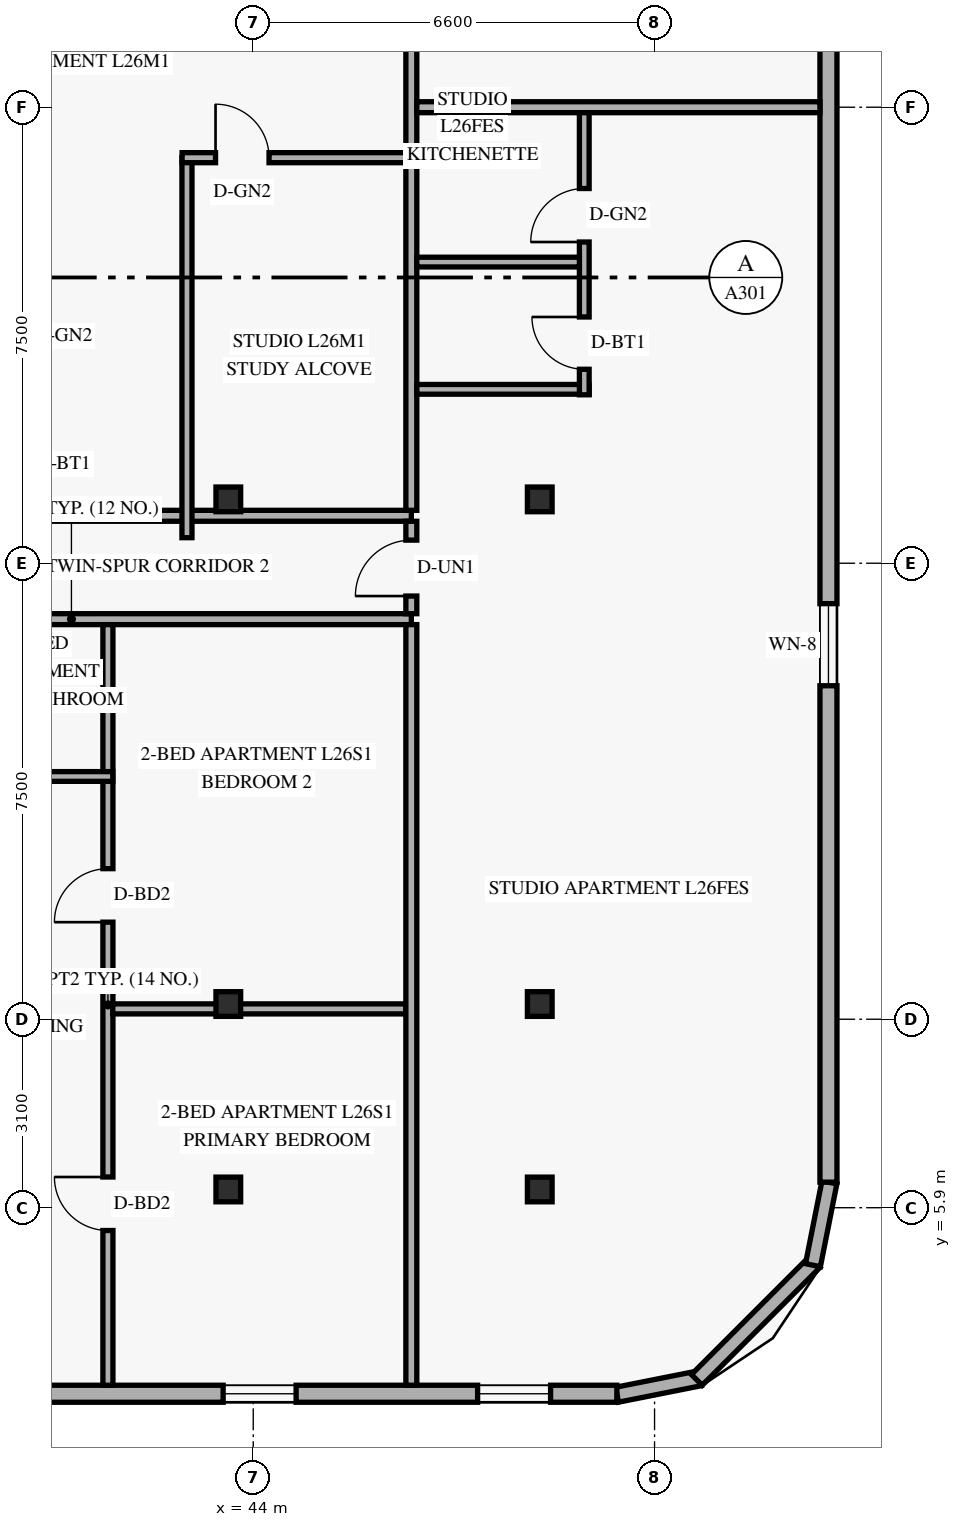
"""IFC4 building model, lengths in metres.
Left out: names, types, materials, properties, quantities, classifications, styles, units other than length and angle.
Written with IfcOpenShell. Run it as: python <this file> out.ifc"""

import sys

from ifc_helpers import new_model, si_unit, direction, frame, frame_2d, origin, origin_2d, place, context, subcontext, project, spatial, rectangle, hollow_rectangle, extrude, element, fill, save


model = new_model("IFC4")
c1 = context("Model", 3, precision=1e-05, world=origin(), true_north=direction((0.0, 1.0)))
c2 = subcontext(c1, "Body", "Model", "MODEL_VIEW")
j1 = project(units=[si_unit("LENGTHUNIT", "METRE"), si_unit("PLANEANGLEUNIT", "RADIAN")], contexts=[c1])
p1 = place(None, origin())
s1 = spatial("IfcSite", under=j1, at=p1, CompositionType="ELEMENT")
p2 = place(p1, origin())
s2 = spatial("IfcBuilding", under=s1, at=p2, CompositionType="ELEMENT")
p3 = place(p2, frame((0.0, 0.0, 102.6)))
s3 = spatial("IfcBuildingStorey", under=s2, at=p3, CompositionType="ELEMENT", Elevation=102.6)
for number, where, z_axis, x_axis in (
    (1, (43.527, 6.2, 0.0), (0.035, 0.0, 0.999), (0.0, 1.0, 0.0)),
    (2, (43.527, 9.25, 0.0), (0.035, 0.0, 0.999), (0.0, 1.0, 0.0)),
    (3, (43.527, 17.55, 0.0), (0.035, 0.0, 0.999), (0.0, 1.0, 0.0)),
):
    element("IfcColumn", number, at=place(p3, frame(where, z_axis=z_axis, x_axis=x_axis)), inside=s3, PredefinedType="COLUMN", context=c2, shape_type="SweptSolid", body=[
        extrude(hollow_rectangle(XDim=0.406, YDim=0.406, WallThickness=0.016, at=origin_2d()), origin(), (0.0, 0.0, 1.0), 3.602),
    ])
for number, where, z_axis, x_axis in (
    (4, (48.608, 6.2, 0.0), (0.058, 0.0, 0.998), (0.0, 1.0, 0.0)),
    (5, (48.608, 9.25, 0.0), (0.058, 0.0, 0.998), (0.0, 1.0, 0.0)),
    (6, (48.608, 17.55, 0.0), (0.058, 0.0, 0.998), (0.0, 1.0, 0.0)),
):
    element("IfcColumn", number, at=place(p3, frame(where, z_axis=z_axis, x_axis=x_axis)), inside=s3, PredefinedType="COLUMN", context=c2, shape_type="SweptSolid", body=[
        extrude(hollow_rectangle(XDim=0.406, YDim=0.406, WallThickness=0.016, at=origin_2d()), origin(), (0.0, 0.0, 1.0), 3.606),
    ])
p4 = place(p3, frame((49.983, 2.824, 0.0), z_axis=(0.0, 0.0, 1.0), x_axis=(0.980809899341, 0.19496651342, 0.0)))
e7 = element("IfcWall", 7, at=p4, inside=s3, PredefinedType="SOLIDWALL", context=c2, shape_type="SweptSolid", body=[
    extrude(rectangle(XDim=1.389, YDim=0.25, at=frame_2d((0.694, 0.0))), origin(), (0.0, 0.0, 1.0), 3.36),
])
p5 = place(p3, frame((51.295, 3.068, 0.0), z_axis=(0.0, 0.0, 1.0), x_axis=(0.707151344399, 0.707062215165, 0.0)))
e8 = element("IfcWall", 8, at=p5, inside=s3, PredefinedType="SOLIDWALL", context=c2, shape_type="SweptSolid", body=[
    extrude(rectangle(XDim=2.739, YDim=0.25, at=frame_2d((1.37, 0.0))), origin(), (0.0, 0.0, 1.0), 3.36),
])
p6 = place(p3, frame((53.205, 4.955, 0.0), z_axis=(0.0, 0.0, 1.0), x_axis=(0.195000137217, 0.980803214965, 0.0)))
e9 = element("IfcWall", 9, at=p6, inside=s3, PredefinedType="SOLIDWALL", context=c2, shape_type="SweptSolid", body=[
    extrude(rectangle(XDim=1.388, YDim=0.25, at=frame_2d((0.694, 0.0))), origin(), (0.0, 0.0, 1.0), 3.36),
])
p7 = place(p3, frame((13.42, 2.84, 0.0), z_axis=(0.0, 0.0, 1.0), x_axis=(1.0, 0.0, 0.0)))
e10 = element("IfcWall", 10, at=p7, inside=s3, PredefinedType="SOLIDWALL", context=c2, shape_type="SweptSolid", body=[
    extrude(rectangle(XDim=36.56, YDim=0.28, at=frame_2d((18.28, 0.0))), origin(), (0.0, 0.0, 1.0), 3.36),
])
p8 = place(p7, frame((3.515, 0.0, 0.85)))
e11 = element("IfcOpeningElement", 11, at=p8, cuts=e10, PredefinedType="OPENING", context=c2, shape_type="SweptSolid", body=[
    extrude(rectangle(XDim=1.2, YDim=1.5, at=frame_2d((0.6, 0.75))), frame((0.0, 0.15, 0.0), z_axis=(0.0, -1.0, 0.0), x_axis=(1.0, 0.0, 0.0)), (0.0, 0.0, 1.0), 0.3),
])
p9 = place(p7, frame((10.005, 0.0, 0.85)))
e12 = element("IfcOpeningElement", 12, at=p9, cuts=e10, PredefinedType="OPENING", context=c2, shape_type="SweptSolid", body=[
    extrude(rectangle(XDim=1.2, YDim=1.5, at=frame_2d((0.6, 0.75))), frame((0.0, 0.15, 0.0), z_axis=(0.0, -1.0, 0.0), x_axis=(1.0, 0.0, 0.0)), (0.0, 0.0, 1.0), 0.3),
])
p10 = place(p7, frame((16.89, 0.0, 0.85)))
e13 = element("IfcOpeningElement", 13, at=p10, cuts=e10, PredefinedType="OPENING", context=c2, shape_type="SweptSolid", body=[
    extrude(rectangle(XDim=1.2, YDim=1.5, at=frame_2d((0.6, 0.75))), frame((0.0, 0.15, 0.0), z_axis=(0.0, -1.0, 0.0), x_axis=(1.0, 0.0, 0.0)), (0.0, 0.0, 1.0), 0.3),
])
p11 = place(p7, frame((24.495, 0.0, 0.85)))
e14 = element("IfcOpeningElement", 14, at=p11, cuts=e10, PredefinedType="OPENING", context=c2, shape_type="SweptSolid", body=[
    extrude(rectangle(XDim=1.2, YDim=1.5, at=frame_2d((0.6, 0.75))), frame((0.0, 0.15, 0.0), z_axis=(0.0, -1.0, 0.0), x_axis=(1.0, 0.0, 0.0)), (0.0, 0.0, 1.0), 0.3),
])
p12 = place(p7, frame((30.085, 0.0, 0.85)))
e15 = element("IfcOpeningElement", 15, at=p12, cuts=e10, PredefinedType="OPENING", context=c2, shape_type="SweptSolid", body=[
    extrude(rectangle(XDim=1.2, YDim=1.5, at=frame_2d((0.6, 0.75))), frame((0.0, 0.15, 0.0), z_axis=(0.0, -1.0, 0.0), x_axis=(1.0, 0.0, 0.0)), (0.0, 0.0, 1.0), 0.3),
])
p13 = place(p7, frame((34.27, 0.0, 0.85)))
e16 = element("IfcOpeningElement", 16, at=p13, cuts=e10, PredefinedType="OPENING", context=c2, shape_type="SweptSolid", body=[
    extrude(rectangle(XDim=1.2, YDim=1.5, at=frame_2d((0.6, 0.75))), frame((0.0, 0.15, 0.0), z_axis=(0.0, -1.0, 0.0), x_axis=(1.0, 0.0, 0.0)), (0.0, 0.0, 1.0), 0.3),
])
p14 = place(p3, frame((53.46, 6.32, 0.0), z_axis=(0.0, 0.0, 1.0), x_axis=(0.0, 1.0, 0.0)))
e17 = element("IfcWall", 17, at=p14, inside=s3, PredefinedType="SOLIDWALL", context=c2, shape_type="SweptSolid", body=[
    extrude(rectangle(XDim=35.36, YDim=0.28, at=frame_2d((17.68, 0.0))), origin(), (0.0, 0.0, 1.0), 3.36),
])
p15 = place(p14, frame((8.165, 0.0, 0.85)))
e18 = element("IfcOpeningElement", 18, at=p15, cuts=e17, PredefinedType="OPENING", context=c2, shape_type="SweptSolid", body=[
    extrude(rectangle(XDim=1.35, YDim=1.55, at=frame_2d((0.675, 0.775))), frame((0.0, 0.15, 0.0), z_axis=(0.0, -1.0, 0.0), x_axis=(1.0, 0.0, 0.0)), (0.0, 0.0, 1.0), 0.3),
])
p16 = place(p14, frame((25.845, 0.0, 0.85)))
e19 = element("IfcOpeningElement", 19, at=p16, cuts=e17, PredefinedType="OPENING", context=c2, shape_type="SweptSolid", body=[
    extrude(rectangle(XDim=1.35, YDim=1.55, at=frame_2d((0.675, 0.775))), frame((0.0, 0.15, 0.0), z_axis=(0.0, -1.0, 0.0), x_axis=(1.0, 0.0, 0.0)), (0.0, 0.0, 1.0), 0.3),
])
p17 = place(p3, frame((35.42, 15.58, 0.0), z_axis=(0.0, 0.0, 1.0), x_axis=(1.0, 0.0, 0.0)))
e20 = element("IfcWall", 20, at=p17, inside=s3, PredefinedType="STANDARD", context=c2, shape_type="SweptSolid", body=[
    extrude(rectangle(XDim=11.18, YDim=0.18, at=frame_2d((5.59, 0.0))), origin(), (0.0, 0.0, 1.0), 2.731),
])
p18 = place(p17, frame((0.41, 0.0, 0.0)))
e21 = element("IfcOpeningElement", 21, at=p18, cuts=e20, PredefinedType="OPENING", context=c2, shape_type="SweptSolid", body=[
    extrude(rectangle(XDim=0.92, YDim=2.15, at=frame_2d((0.46, 1.075))), frame((0.0, 0.1, 0.0), z_axis=(0.0, -1.0, 0.0), x_axis=(1.0, 0.0, 0.0)), (0.0, 0.0, 1.0), 0.2),
])
p19 = place(p3, frame((37.64, 17.28, 0.0), z_axis=(0.0, 0.0, 1.0), x_axis=(1.0, 0.0, 0.0)))
e22 = element("IfcWall", 22, at=p19, inside=s3, PredefinedType="STANDARD", context=c2, shape_type="SweptSolid", body=[
    extrude(rectangle(XDim=8.96, YDim=0.18, at=frame_2d((4.48, 0.0))), origin(), (0.0, 0.0, 1.0), 2.731),
])
p20 = place(p3, frame((41.61, 2.98, 0.0), z_axis=(0.0, 0.0, 1.0), x_axis=(0.0, 1.0, 0.0)))
e23 = element("IfcWall", 23, at=p20, inside=s3, PredefinedType="PARTITIONING", context=c2, shape_type="SweptSolid", body=[
    extrude(rectangle(XDim=12.51, YDim=0.165, at=frame_2d((6.255, 0.0))), origin(), (0.0, 0.0, 1.0), 2.731),
])
p21 = place(p20, frame((2.545, 0.0, 0.0)))
e24 = element("IfcOpeningElement", 24, at=p21, cuts=e23, PredefinedType="OPENING", context=c2, shape_type="SweptSolid", body=[
    extrude(rectangle(XDim=0.88, YDim=2.14, at=frame_2d((0.44, 1.07))), frame((0.0, 0.093, 0.0), z_axis=(0.0, -1.0, 0.0), x_axis=(1.0, 0.0, 0.0)), (0.0, 0.0, 1.0), 0.185),
])
p22 = place(p20, frame((7.616, 0.0, 0.0)))
e25 = element("IfcOpeningElement", 25, at=p22, cuts=e23, PredefinedType="OPENING", context=c2, shape_type="SweptSolid", body=[
    extrude(rectangle(XDim=0.88, YDim=2.14, at=frame_2d((0.44, 1.07))), frame((0.0, 0.093, 0.0), z_axis=(0.0, -1.0, 0.0), x_axis=(1.0, 0.0, 0.0)), (0.0, 0.0, 1.0), 0.185),
])
p23 = place(p3, frame((36.98, 12.992, 0.0), z_axis=(0.0, 0.0, 1.0), x_axis=(1.0, 0.0, 0.0)))
e26 = element("IfcWall", 26, at=p23, inside=s3, PredefinedType="PLUMBINGWALL", context=c2, shape_type="SweptSolid", body=[
    extrude(rectangle(XDim=4.71, YDim=0.16, at=frame_2d((2.355, 0.0))), origin(), (0.0, 0.0, 1.0), 3.36),
])
p24 = place(p23, frame((0.38, 0.0, 0.0)))
e27 = element("IfcOpeningElement", 27, at=p24, cuts=e26, PredefinedType="OPENING", context=c2, shape_type="SweptSolid", body=[
    extrude(rectangle(XDim=0.88, YDim=2.12, at=frame_2d((0.44, 1.06))), frame((0.0, 0.09, 0.0), z_axis=(0.0, -1.0, 0.0), x_axis=(1.0, 0.0, 0.0)), (0.0, 0.0, 1.0), 0.18),
])
p25 = place(p23, frame((2.786, 0.0, 0.0)))
e28 = element("IfcOpeningElement", 28, at=p25, cuts=e26, PredefinedType="OPENING", context=c2, shape_type="SweptSolid", body=[
    extrude(rectangle(XDim=0.86, YDim=2.12, at=frame_2d((0.43, 1.06))), frame((0.0, 0.09, 0.0), z_axis=(0.0, -1.0, 0.0), x_axis=(1.0, 0.0, 0.0)), (0.0, 0.0, 1.0), 0.18),
])
p26 = place(p3, frame((41.69, 9.17, 0.0), z_axis=(0.0, 0.0, 1.0), x_axis=(1.0, 0.0, 0.0)))
e29 = element("IfcWall", 29, at=p26, inside=s3, PredefinedType="PARTITIONING", context=c2, shape_type="SweptSolid", body=[
    extrude(rectangle(XDim=4.82, YDim=0.165, at=frame_2d((2.41, 0.0))), origin(), (0.0, 0.0, 1.0), 2.731),
])
p27 = place(p3, frame((42.91, 16.92, 0.0), z_axis=(0.0, 0.0, 1.0), x_axis=(0.0, 1.0, 0.0)))
e30 = element("IfcWall", 30, at=p27, inside=s3, PredefinedType="PARTITIONING", context=c2, shape_type="SweptSolid", body=[
    extrude(rectangle(XDim=6.25, YDim=0.165, at=frame_2d((3.125, 0.0))), origin(), (0.0, 0.0, 1.0), 2.731),
])
p28 = place(p3, frame((42.83, 23.17, 0.0), z_axis=(0.0, 0.0, 1.0), x_axis=(1.0, 0.0, 0.0)))
e31 = element("IfcWall", 31, at=p28, inside=s3, PredefinedType="PARTITIONING", context=c2, shape_type="SweptSolid", body=[
    extrude(rectangle(XDim=4.13, YDim=0.165, at=frame_2d((2.065, 0.0))), origin(), (0.0, 0.0, 1.0), 2.731),
])
p29 = place(p28, frame((0.55, 0.0, 0.0)))
e32 = element("IfcOpeningElement", 32, at=p29, cuts=e31, PredefinedType="OPENING", context=c2, shape_type="SweptSolid", body=[
    extrude(rectangle(XDim=0.88, YDim=2.12, at=frame_2d((0.44, 1.06))), frame((0.0, 0.093, 0.0), z_axis=(0.0, -1.0, 0.0), x_axis=(1.0, 0.0, 0.0)), (0.0, 0.0, 1.0), 0.185),
])
p30 = place(p3, frame((46.6, 15.67, 0.0), z_axis=(0.0, 0.0, 1.0), x_axis=(0.0, 1.0, 0.0)))
e33 = element("IfcWall", 33, at=p30, inside=s3, PredefinedType="STANDARD", context=c2, shape_type="SweptSolid", body=[
    extrude(rectangle(XDim=1.52, YDim=0.18, at=frame_2d((0.76, 0.0))), origin(), (0.0, 0.0, 1.0), 3.36),
])
p31 = place(p30, frame((0.29, 0.0, 0.0)))
e34 = element("IfcOpeningElement", 34, at=p31, cuts=e33, PredefinedType="OPENING", context=c2, shape_type="SweptSolid", body=[
    extrude(rectangle(XDim=0.92, YDim=2.15, at=frame_2d((0.46, 1.075))), frame((0.0, 0.1, 0.0), z_axis=(0.0, -1.0, 0.0), x_axis=(1.0, 0.0, 0.0)), (0.0, 0.0, 1.0), 0.2),
])
p32 = place(p3, frame((46.6, 2.98, 0.0), z_axis=(0.0, 0.0, 1.0), x_axis=(0.0, 1.0, 0.0)))
e35 = element("IfcWall", 35, at=p32, inside=s3, PredefinedType="PARTITIONING", context=c2, shape_type="SweptSolid", body=[
    extrude(rectangle(XDim=12.51, YDim=0.18, at=frame_2d((6.255, 0.0))), origin(), (0.0, 0.0, 1.0), 2.731),
])
p33 = place(p3, frame((46.6, 17.37, 0.0), z_axis=(0.0, 0.0, 1.0), x_axis=(0.0, 1.0, 0.0)))
e36 = element("IfcWall", 36, at=p33, inside=s3, PredefinedType="PARTITIONING", context=c2, shape_type="SweptSolid", body=[
    extrude(rectangle(XDim=10.1, YDim=0.18, at=frame_2d((5.05, 0.0))), origin(), (0.0, 0.0, 1.0), 2.731),
])
p34 = place(p3, frame((46.69, 24.0, 0.0), z_axis=(0.0, 0.0, 1.0), x_axis=(1.0, 0.0, 0.0)))
e37 = element("IfcWall", 37, at=p34, inside=s3, PredefinedType="PARTITIONING", context=c2, shape_type="SweptSolid", body=[
    extrude(rectangle(XDim=6.63, YDim=0.18, at=frame_2d((3.315, 0.0))), origin(), (0.0, 0.0, 1.0), 2.809),
])
p35 = place(p3, frame((46.69, 19.36, 0.0), z_axis=(0.0, 0.0, 1.0), x_axis=(1.0, 0.0, 0.0)))
e38 = element("IfcWall", 38, at=p35, inside=s3, PredefinedType="PLUMBINGWALL", context=c2, shape_type="SweptSolid", body=[
    extrude(rectangle(XDim=2.834, YDim=0.16, at=frame_2d((1.417, 0.0))), origin(), (0.0, 0.0, 1.0), 2.809),
])
p36 = place(p3, frame((49.444, 19.27, 0.0), z_axis=(0.0, 0.0, 1.0), x_axis=(0.0, 1.0, 0.0)))
e39 = element("IfcWall", 39, at=p36, inside=s3, PredefinedType="PLUMBINGWALL", context=c2, shape_type="SweptSolid", body=[
    extrude(rectangle(XDim=4.64, YDim=0.16, at=frame_2d((2.32, 0.0))), origin(), (0.0, 0.0, 1.0), 3.36),
])
p37 = place(p36, frame((0.42, 0.0, 0.0)))
e40 = element("IfcOpeningElement", 40, at=p37, cuts=e39, PredefinedType="OPENING", context=c2, shape_type="SweptSolid", body=[
    extrude(rectangle(XDim=0.86, YDim=2.12, at=frame_2d((0.43, 1.06))), frame((0.0, 0.09, 0.0), z_axis=(0.0, -1.0, 0.0), x_axis=(1.0, 0.0, 0.0)), (0.0, 0.0, 1.0), 0.18),
])
p38 = place(p36, frame((2.513, 0.0, 0.0)))
e41 = element("IfcOpeningElement", 41, at=p38, cuts=e39, PredefinedType="OPENING", context=c2, shape_type="SweptSolid", body=[
    extrude(rectangle(XDim=0.88, YDim=2.12, at=frame_2d((0.44, 1.06))), frame((0.0, 0.09, 0.0), z_axis=(0.0, -1.0, 0.0), x_axis=(1.0, 0.0, 0.0)), (0.0, 0.0, 1.0), 0.18),
])
p39 = place(p3, frame((46.69, 21.453, 0.0), z_axis=(0.0, 0.0, 1.0), x_axis=(1.0, 0.0, 0.0)))
e42 = element("IfcWall", 42, at=p39, inside=s3, PredefinedType="PLUMBINGWALL", context=c2, shape_type="SweptSolid", body=[
    extrude(rectangle(XDim=2.674, YDim=0.16, at=frame_2d((1.337, 0.0))), origin(), (0.0, 0.0, 1.0), 2.809),
])
p40 = place(p12, origin())
e43 = element("IfcWindow", 43, at=p40, inside=s3, PartitioningType="SINGLE_PANEL", PredefinedType="WINDOW", context=c2, shape_type="SweptSolid", body=[
    extrude(rectangle(XDim=1.2, YDim=1.5, at=frame_2d((0.6, 0.75))), frame((0.0, 0.03, 0.0), z_axis=(0.0, -1.0, 0.0), x_axis=(1.0, 0.0, 0.0)), (0.0, 0.0, 1.0), 0.06),
])
fill(e15, e43)
p41 = place(p13, origin())
e44 = element("IfcWindow", 44, at=p41, inside=s3, PartitioningType="SINGLE_PANEL", PredefinedType="WINDOW", context=c2, shape_type="SweptSolid", body=[
    extrude(rectangle(XDim=1.2, YDim=1.5, at=frame_2d((0.6, 0.75))), frame((0.0, 0.03, 0.0), z_axis=(0.0, -1.0, 0.0), x_axis=(1.0, 0.0, 0.0)), (0.0, 0.0, 1.0), 0.06),
])
fill(e16, e44)
p42 = place(p15, origin())
e45 = element("IfcWindow", 45, at=p42, inside=s3, PartitioningType="SINGLE_PANEL", PredefinedType="WINDOW", context=c2, shape_type="SweptSolid", body=[
    extrude(rectangle(XDim=1.35, YDim=1.55, at=frame_2d((0.675, 0.775))), frame((0.0, 0.03, 0.0), z_axis=(0.0, -1.0, 0.0), x_axis=(1.0, 0.0, 0.0)), (0.0, 0.0, 1.0), 0.06),
])
fill(e18, e45)
p43 = place(p21, origin())
e46 = element("IfcDoor", 46, at=p43, inside=s3, OperationType="SINGLE_SWING_RIGHT", PredefinedType="DOOR", context=c2, shape_type="SweptSolid", body=[
    extrude(rectangle(XDim=0.88, YDim=2.14, at=frame_2d((0.44, 1.07))), frame((0.0, 0.025, 0.0), z_axis=(0.0, -1.0, 0.0), x_axis=(1.0, 0.0, 0.0)), (0.0, 0.0, 1.0), 0.05),
])
fill(e24, e46)
p44 = place(p22, origin())
e47 = element("IfcDoor", 47, at=p44, inside=s3, OperationType="SINGLE_SWING_LEFT", PredefinedType="DOOR", context=c2, shape_type="SweptSolid", body=[
    extrude(rectangle(XDim=0.88, YDim=2.14, at=frame_2d((0.44, 1.07))), frame((0.0, 0.025, 0.0), z_axis=(0.0, -1.0, 0.0), x_axis=(1.0, 0.0, 0.0)), (0.0, 0.0, 1.0), 0.05),
])
fill(e25, e47)
p45 = place(p29, origin())
e48 = element("IfcDoor", 48, at=p45, inside=s3, OperationType="SINGLE_SWING_LEFT", PredefinedType="DOOR", context=c2, shape_type="SweptSolid", body=[
    extrude(rectangle(XDim=0.88, YDim=2.12, at=frame_2d((0.44, 1.06))), frame((0.0, 0.025, 0.0), z_axis=(0.0, -1.0, 0.0), x_axis=(1.0, 0.0, 0.0)), (0.0, 0.0, 1.0), 0.05),
])
fill(e32, e48)
p46 = place(p31, origin())
e49 = element("IfcDoor", 49, at=p46, inside=s3, OperationType="SINGLE_SWING_LEFT", PredefinedType="DOOR", context=c2, shape_type="SweptSolid", body=[
    extrude(rectangle(XDim=0.92, YDim=2.15, at=frame_2d((0.46, 1.075))), frame((0.0, 0.025, 0.0), z_axis=(0.0, -1.0, 0.0), x_axis=(1.0, 0.0, 0.0)), (0.0, 0.0, 1.0), 0.05),
])
fill(e34, e49)
p47 = place(p37, origin())
e50 = element("IfcDoor", 50, at=p47, inside=s3, OperationType="SINGLE_SWING_RIGHT", PredefinedType="DOOR", context=c2, shape_type="SweptSolid", body=[
    extrude(rectangle(XDim=0.86, YDim=2.12, at=frame_2d((0.43, 1.06))), frame((0.0, 0.025, 0.0), z_axis=(0.0, -1.0, 0.0), x_axis=(1.0, 0.0, 0.0)), (0.0, 0.0, 1.0), 0.05),
])
fill(e40, e50)
p48 = place(p38, origin())
e51 = element("IfcDoor", 51, at=p48, inside=s3, OperationType="SINGLE_SWING_LEFT", PredefinedType="DOOR", context=c2, shape_type="SweptSolid", body=[
    extrude(rectangle(XDim=0.88, YDim=2.12, at=frame_2d((0.44, 1.06))), frame((0.0, 0.025, 0.0), z_axis=(0.0, -1.0, 0.0), x_axis=(1.0, 0.0, 0.0)), (0.0, 0.0, 1.0), 0.05),
])
fill(e41, e51)
save(model, sys.argv[1])
